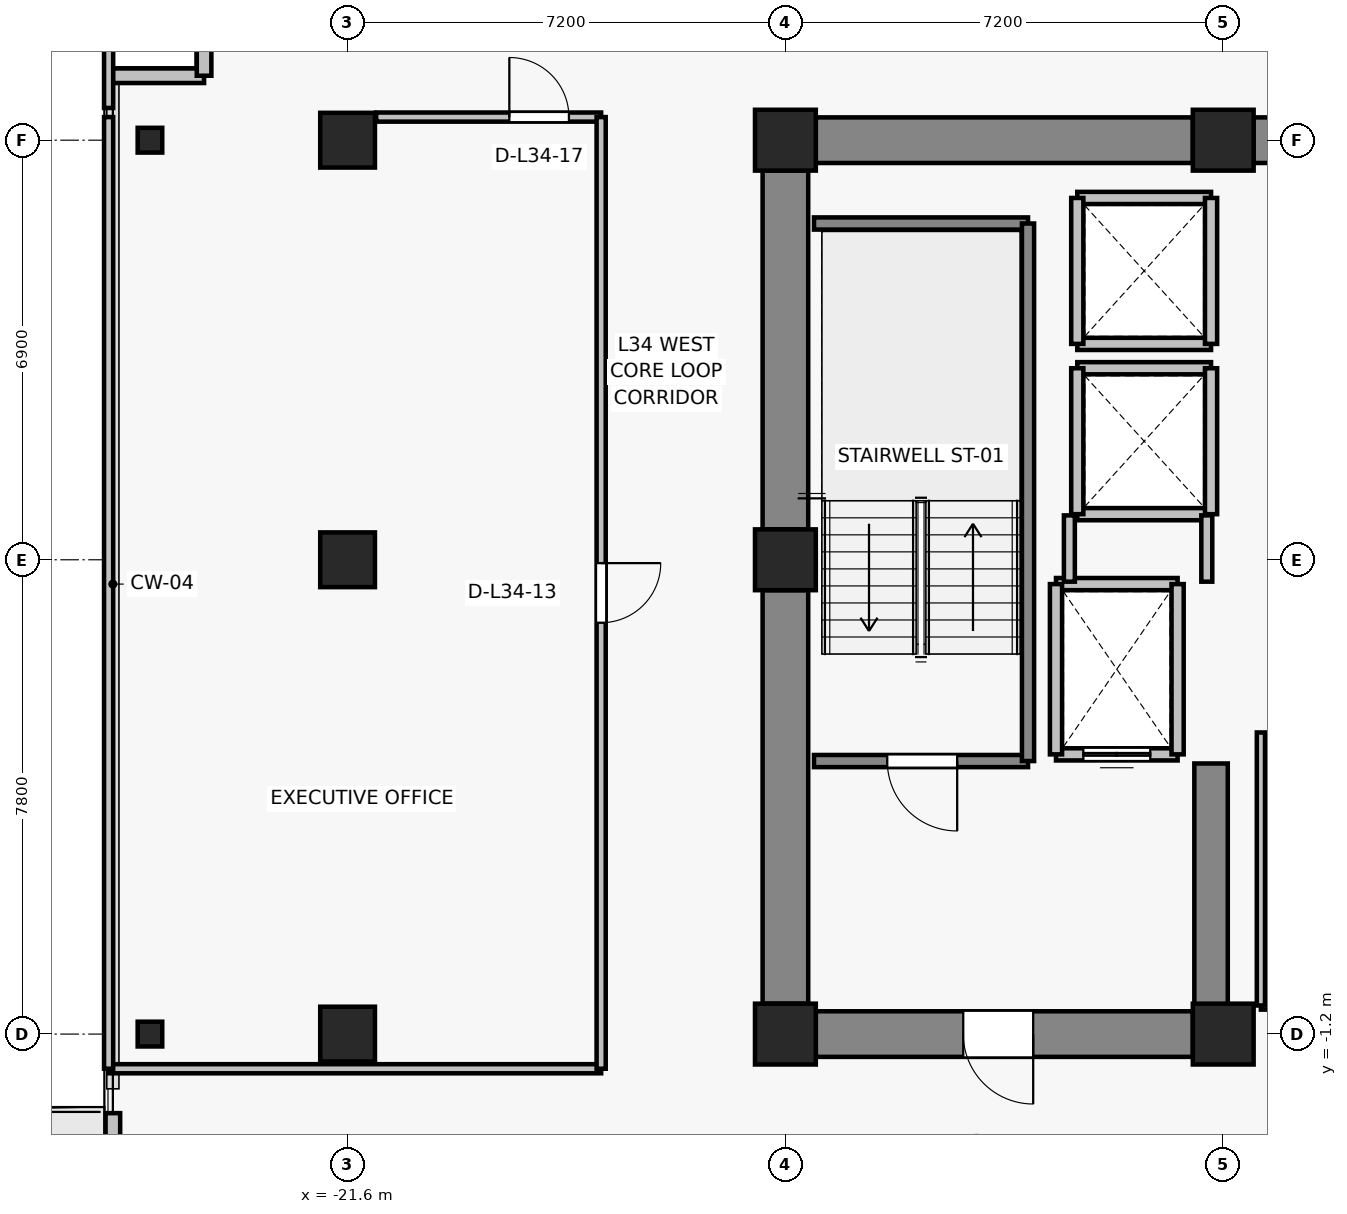
"""IFC4 building model, lengths in metres.
Left out: names, types, materials, properties, quantities, classifications, styles, units other than length and angle.
Written with IfcOpenShell. Run it as: python <this file> out.ifc"""

import sys

from ifc_helpers import new_model, si_unit, direction, frame, frame_2d, origin, origin_2d, place, context, subcontext, project, spatial, rectangle, i_section, extrude, source, transform, mapped, element, fill, save


model = new_model("IFC4")
c1 = context("Model", 3, precision=1e-05, world=origin(), true_north=direction((0.0, 1.0)))
c2 = subcontext(c1, "Body", "Model", "MODEL_VIEW")
j1 = project(units=[si_unit("LENGTHUNIT", "METRE"), si_unit("PLANEANGLEUNIT", "RADIAN")], contexts=[c1])
p1 = place(None, origin())
s1 = spatial("IfcSite", under=j1, at=p1, CompositionType="ELEMENT")
p2 = place(p1, origin())
s2 = spatial("IfcBuilding", under=s1, at=p2, CompositionType="ELEMENT")
p3 = place(p2, frame((0.0, 0.0, 123.1)))
s3 = spatial("IfcBuildingStorey", under=s2, at=p3, CompositionType="ELEMENT", Elevation=123.1)
for number, where, z_axis, x_axis in (
    (1, (-14.4, -1.2, 0.0), (0.0, 0.0, 1.0), (1.0, 0.0, 0.0)),
    (2, (-7.2, -1.2, 0.0), (0.0, 0.0, 1.0), (1.0, 0.0, 0.0)),
    (3, (-14.4, 6.6, 0.0), (0.0, 0.0, 1.0), (1.0, 0.0, 0.0)),
    (4, (-14.4, 13.5, 0.0), (0.0, 0.0, 1.0), (1.0, 0.0, 0.0)),
    (5, (-7.2, 13.5, 0.0), (0.0, 0.0, 1.0), (1.0, 0.0, 0.0)),
):
    element("IfcColumn", number, at=place(p3, frame(where, z_axis=z_axis, x_axis=x_axis)), inside=s3, PredefinedType="COLUMN", context=c2, shape_type="SweptSolid", body=[
        extrude(rectangle(XDim=1.0, YDim=1.0, at=origin_2d()), origin(), (0.0, 0.0, 1.0), 3.3),
    ])
for number, where, z_axis, x_axis in (
    (6, (-21.6, -1.2, 0.0), (0.0, 0.0, 1.0), (1.0, 0.0, 0.0)),
    (7, (-21.6, 6.6, 0.0), (0.0, 0.0, 1.0), (1.0, 0.0, 0.0)),
    (8, (-21.6, 13.5, 0.0), (0.0, 0.0, 1.0), (1.0, 0.0, 0.0)),
):
    element("IfcColumn", number, at=place(p3, frame(where, z_axis=z_axis, x_axis=x_axis)), inside=s3, PredefinedType="COLUMN", context=c2, shape_type="SweptSolid", body=[
        extrude(rectangle(XDim=0.9, YDim=0.9, at=origin_2d()), origin(), (0.0, 0.0, 1.0), 3.3),
    ])
for number, where, z_axis, x_axis in (
    (9, (-24.85, -1.2, 0.0), (0.0, 0.0, 1.0), (1.0, 0.0, 0.0)),
    (10, (-24.85, 13.5, 0.0), (0.0, 0.0, 1.0), (1.0, 0.0, 0.0)),
):
    element("IfcColumn", number, at=place(p3, frame(where, z_axis=z_axis, x_axis=x_axis)), inside=s3, PredefinedType="COLUMN", context=c2, shape_type="SweptSolid", body=[
        extrude(i_section(OverallWidth=0.404, OverallDepth=0.407, WebThickness=0.022, FlangeThickness=0.032, FilletRadius=0.015, at=origin_2d()), origin(), (0.0, 0.0, 1.0), 3.3),
    ])
p4 = place(p3, frame((-13.9, 13.5, 0.0), z_axis=(0.0, 0.0, 1.0), x_axis=(1.0, 0.0, 0.0)))
e11 = element("IfcWall", 11, at=p4, inside=s3, PredefinedType="SHEAR", context=c2, shape_type="SweptSolid", body=[
    extrude(rectangle(XDim=6.2, YDim=0.75, at=frame_2d((3.1, 0.0))), origin(), (0.0, 0.0, 1.0), 3.075),
])
p5 = place(p3, frame((-6.7, 13.5, 0.0), z_axis=(0.0, 0.0, 1.0), x_axis=(1.0, 0.0, 0.0)))
e12 = element("IfcWall", 12, at=p5, inside=s3, PredefinedType="SHEAR", context=c2, shape_type="SweptSolid", body=[
    extrude(rectangle(XDim=13.4, YDim=0.75, at=frame_2d((6.7, 0.0))), origin(), (0.0, 0.0, 1.0), 3.075),
])
p6 = place(p3, frame((-14.4, -0.7, 0.0), z_axis=(0.0, 0.0, 1.0), x_axis=(0.0, 1.0, 0.0)))
e13 = element("IfcWall", 13, at=p6, inside=s3, PredefinedType="SHEAR", context=c2, shape_type="SweptSolid", body=[
    extrude(rectangle(XDim=6.8, YDim=0.75, at=frame_2d((3.4, 0.0))), origin(), (0.0, 0.0, 1.0), 3.075),
])
p7 = place(p3, frame((-14.4, 7.1, 0.0), z_axis=(0.0, 0.0, 1.0), x_axis=(0.0, 1.0, 0.0)))
e14 = element("IfcWall", 14, at=p7, inside=s3, PredefinedType="SHEAR", context=c2, shape_type="SweptSolid", body=[
    extrude(rectangle(XDim=5.9, YDim=0.75, at=frame_2d((2.95, 0.0))), origin(), (0.0, 0.0, 1.0), 3.075),
])
p8 = place(p3, frame((-7.7, -1.2, 0.0), z_axis=(0.0, 0.0, 1.0), x_axis=(-1.0, 0.0, 0.0)))
e15 = element("IfcWall", 15, at=p8, inside=s3, PredefinedType="SHEAR", context=c2, shape_type="SweptSolid", body=[
    extrude(rectangle(XDim=6.2, YDim=0.75, at=frame_2d((3.1, 0.0))), origin(), (0.0, 0.0, 1.0), 3.075),
])
p9 = place(p8, frame((2.625, 0.0, 0.0)))
e16 = element("IfcOpeningElement", 16, at=p9, cuts=e15, PredefinedType="OPENING", context=c2, shape_type="SweptSolid", body=[
    extrude(rectangle(XDim=1.15, YDim=2.15, at=frame_2d((0.575, 1.075))), frame((0.0, 0.385, 0.0), z_axis=(0.0, -1.0, 0.0), x_axis=(1.0, 0.0, 0.0)), (0.0, 0.0, 1.0), 0.77),
])
p10 = place(p3, frame((-7.4, -0.825, 0.0), z_axis=(0.0, 0.0, 1.0), x_axis=(0.0, 1.0, 0.0)))
e17 = element("IfcWall", 17, at=p10, inside=s3, PredefinedType="SHEAR", context=c2, shape_type="SweptSolid", body=[
    extrude(rectangle(XDim=4.075, YDim=0.55, at=frame_2d((2.038, 0.0))), origin(), (0.0, 0.0, 1.0), 3.075),
])
p11 = place(p3, frame((-25.46, -8.3, 0.0), z_axis=(0.0, 0.0, 1.0), x_axis=(0.0, 1.0, 0.0)))
e18 = element("IfcWall", 18, at=p11, inside=s3, PredefinedType="SOLIDWALL", context=c2, shape_type="SweptSolid", body=[
    extrude(rectangle(XDim=5.8, YDim=0.24, at=frame_2d((2.9, 0.0))), origin(), (0.0, 0.0, 1.0), 3.075),
])
p12 = place(p11, frame((0.696, 0.0, 0.0)))
e19 = element("IfcOpeningElement", 19, at=p12, cuts=e18, PredefinedType="OPENING", context=c2, shape_type="SweptSolid", body=[
    extrude(rectangle(XDim=1.0, YDim=2.2, at=frame_2d((0.5, 1.1))), frame((0.0, 0.13, 0.0), z_axis=(0.0, -1.0, 0.0), x_axis=(1.0, 0.0, 0.0)), (0.0, 0.0, 1.0), 0.26),
])
p13 = place(p11, frame((2.046, 0.0, 0.85)))
e20 = element("IfcOpeningElement", 20, at=p13, cuts=e18, PredefinedType="OPENING", context=c2, shape_type="SweptSolid", body=[
    extrude(rectangle(XDim=1.2, YDim=1.5, at=frame_2d((0.6, 0.75))), frame((0.0, 0.13, 0.0), z_axis=(0.0, -1.0, 0.0), x_axis=(1.0, 0.0, 0.0)), (0.0, 0.0, 1.0), 0.26),
])
for number, where, z_axis, x_axis in (
    (21, (-23.96, 14.56, 0.0), (0.0, 0.0, 1.0), (-1.0, 0.0, 0.0)),
    (22, (-23.96, 16.06, 0.0), (0.0, 0.0, 1.0), (0.0, -1.0, 0.0)),
):
    element("IfcWall", number, at=place(p3, frame(where, z_axis=z_axis, x_axis=x_axis)), inside=s3, PredefinedType="SOLIDWALL", context=c2, shape_type="SweptSolid", body=[
        extrude(rectangle(XDim=1.5, YDim=0.24, at=frame_2d((0.75, 0.0))), origin(), (0.0, 0.0, 1.0), 3.075),
    ])
p14 = place(p3, frame((-7.95, 3.4, 0.0), z_axis=(0.0, 0.0, 1.0), x_axis=(-1.0, 0.0, 0.0)))
e23 = element("IfcWall", 23, at=p14, inside=s3, PredefinedType="SOLIDWALL", context=c2, shape_type="SweptSolid", body=[
    extrude(rectangle(XDim=2.0, YDim=0.2, at=frame_2d((1.0, 0.0))), origin(), (0.0, 0.0, 1.0), 3.075),
])
p15 = place(p14, frame((0.45, 0.0, 0.0)))
e24 = element("IfcOpeningElement", 24, at=p15, cuts=e23, PredefinedType="OPENING", context=c2, shape_type="SweptSolid", body=[
    extrude(rectangle(XDim=1.1, YDim=2.2, at=frame_2d((0.55, 1.1))), frame((0.0, 0.11, 0.0), z_axis=(0.0, -1.0, 0.0), x_axis=(1.0, 0.0, 0.0)), (0.0, 0.0, 1.0), 0.22),
])
p16 = place(p3, frame((-9.95, 6.2, 0.0), z_axis=(0.0, 0.0, 1.0), x_axis=(1.0, 0.0, 0.0)))
e25 = element("IfcWall", 25, at=p16, inside=s3, PredefinedType="SOLIDWALL", context=c2, shape_type="SweptSolid", body=[
    extrude(rectangle(XDim=2.0, YDim=0.2, at=frame_2d((1.0, 0.0))), origin(), (0.0, 0.0, 1.0), 3.075),
])
for number, where, z_axis, x_axis in (
    (26, (-9.95, 3.4, 0.0), (0.0, 0.0, 1.0), (0.0, 1.0, 0.0)),
    (27, (-7.95, 6.2, 0.0), (0.0, 0.0, 1.0), (0.0, -1.0, 0.0)),
):
    element("IfcWall", number, at=place(p3, frame(where, z_axis=z_axis, x_axis=x_axis)), inside=s3, PredefinedType="SOLIDWALL", context=c2, shape_type="SweptSolid", body=[
        extrude(rectangle(XDim=2.8, YDim=0.2, at=frame_2d((1.4, 0.0))), origin(), (0.0, 0.0, 1.0), 3.075),
    ])
for number, where, z_axis, x_axis in (
    (28, (-7.4, 7.35, 0.0), (0.0, 0.0, 1.0), (-1.0, 0.0, 0.0)),
    (29, (-9.6, 9.75, 0.0), (0.0, 0.0, 1.0), (1.0, 0.0, 0.0)),
):
    element("IfcWall", number, at=place(p3, frame(where, z_axis=z_axis, x_axis=x_axis)), inside=s3, PredefinedType="SOLIDWALL", context=c2, shape_type="SweptSolid", body=[
        extrude(rectangle(XDim=2.2, YDim=0.2, at=frame_2d((1.1, 0.0))), origin(), (0.0, 0.0, 1.0), 2.515),
    ])
p17 = place(p3, frame((-9.6, 7.35, 0.0), z_axis=(0.0, 0.0, 1.0), x_axis=(0.0, 1.0, 0.0)))
e30 = element("IfcWall", 30, at=p17, inside=s3, PredefinedType="SOLIDWALL", context=c2, shape_type="SweptSolid", body=[
    extrude(rectangle(XDim=2.4, YDim=0.2, at=frame_2d((1.2, 0.0))), origin(), (0.0, 0.0, 1.0), 3.075),
])
p18 = place(p3, frame((-7.4, 9.75, 0.0), z_axis=(0.0, 0.0, 1.0), x_axis=(0.0, -1.0, 0.0)))
e31 = element("IfcWall", 31, at=p18, inside=s3, PredefinedType="SOLIDWALL", context=c2, shape_type="SweptSolid", body=[
    extrude(rectangle(XDim=2.4, YDim=0.2, at=frame_2d((1.2, 0.0))), origin(), (0.0, 0.0, 1.0), 2.515),
])
for number, where, z_axis, x_axis in (
    (32, (-7.4, 10.15, 0.0), (0.0, 0.0, 1.0), (-1.0, 0.0, 0.0)),
    (33, (-9.6, 12.55, 0.0), (0.0, 0.0, 1.0), (1.0, 0.0, 0.0)),
):
    element("IfcWall", number, at=place(p3, frame(where, z_axis=z_axis, x_axis=x_axis)), inside=s3, PredefinedType="SOLIDWALL", context=c2, shape_type="SweptSolid", body=[
        extrude(rectangle(XDim=2.2, YDim=0.2, at=frame_2d((1.1, 0.0))), origin(), (0.0, 0.0, 1.0), 2.515),
    ])
p19 = place(p3, frame((-9.6, 10.15, 0.0), z_axis=(0.0, 0.0, 1.0), x_axis=(0.0, 1.0, 0.0)))
e34 = element("IfcWall", 34, at=p19, inside=s3, PredefinedType="SOLIDWALL", context=c2, shape_type="SweptSolid", body=[
    extrude(rectangle(XDim=2.4, YDim=0.2, at=frame_2d((1.2, 0.0))), origin(), (0.0, 0.0, 1.0), 3.075),
])
p20 = place(p3, frame((-7.4, 12.55, 0.0), z_axis=(0.0, 0.0, 1.0), x_axis=(0.0, -1.0, 0.0)))
e35 = element("IfcWall", 35, at=p20, inside=s3, PredefinedType="SOLIDWALL", context=c2, shape_type="SweptSolid", body=[
    extrude(rectangle(XDim=2.4, YDim=0.2, at=frame_2d((1.2, 0.0))), origin(), (0.0, 0.0, 1.0), 2.515),
])
p21 = place(p3, frame((-10.41, 3.29, 0.0), z_axis=(0.0, 0.0, 1.0), x_axis=(-1.0, 0.0, 0.0)))
e36 = element("IfcWall", 36, at=p21, inside=s3, PredefinedType="SOLIDWALL", context=c2, shape_type="SweptSolid", body=[
    extrude(rectangle(XDim=3.52, YDim=0.2, at=frame_2d((1.76, 0.0))), origin(), (0.0, 0.0, 1.0), 3.075),
])
p22 = place(p21, frame((1.165, 0.0, 0.0)))
e37 = element("IfcOpeningElement", 37, at=p22, cuts=e36, PredefinedType="OPENING", context=c2, shape_type="SweptSolid", body=[
    extrude(rectangle(XDim=1.15, YDim=2.15, at=frame_2d((0.575, 1.075))), frame((0.0, 0.11, 0.0), z_axis=(0.0, -1.0, 0.0), x_axis=(1.0, 0.0, 0.0)), (0.0, 0.0, 1.0), 0.22),
])
p23 = place(p3, frame((-13.93, 12.13, 0.0), z_axis=(0.0, 0.0, 1.0), x_axis=(1.0, 0.0, 0.0)))
e38 = element("IfcWall", 38, at=p23, inside=s3, PredefinedType="SOLIDWALL", context=c2, shape_type="SweptSolid", body=[
    extrude(rectangle(XDim=3.52, YDim=0.2, at=frame_2d((1.76, 0.0))), origin(), (0.0, 0.0, 1.0), 3.075),
])
p24 = place(p3, frame((-10.41, 12.13, 0.0), z_axis=(0.0, 0.0, 1.0), x_axis=(0.0, -1.0, 0.0)))
e39 = element("IfcWall", 39, at=p24, inside=s3, PredefinedType="SOLIDWALL", context=c2, shape_type="SweptSolid", body=[
    extrude(rectangle(XDim=8.84, YDim=0.2, at=frame_2d((4.42, 0.0))), origin(), (0.0, 0.0, 1.0), 3.075),
])
p25 = place(p3, frame((-9.73, 6.24, 0.0), z_axis=(0.0, 0.0, 1.0), x_axis=(0.0, 1.0, 0.0)))
e40 = element("IfcWall", 40, at=p25, inside=s3, PredefinedType="PARTITIONING", context=c2, shape_type="SweptSolid", body=[
    extrude(rectangle(XDim=1.09, YDim=0.18, at=frame_2d((0.545, 0.0))), origin(), (0.0, 0.0, 1.0), 3.075),
])
p26 = place(p3, frame((-7.47, 7.33, 0.0), z_axis=(0.0, 0.0, 1.0), x_axis=(0.0, -1.0, 0.0)))
e41 = element("IfcWall", 41, at=p26, inside=s3, PredefinedType="PARTITIONING", context=c2, shape_type="SweptSolid", body=[
    extrude(rectangle(XDim=1.09, YDim=0.18, at=frame_2d((0.545, 0.0))), origin(), (0.0, 0.0, 1.0), 2.515),
])
p27 = place(p3, frame((-1.47, -0.73, 0.0), z_axis=(0.0, 0.0, 1.0), x_axis=(-1.0, 0.0, 0.0)))
e42 = element("IfcWall", 42, at=p27, inside=s3, PredefinedType="PARTITIONING", context=c2, shape_type="SweptSolid", body=[
    extrude(rectangle(XDim=5.11, YDim=0.135, at=frame_2d((2.555, 0.0))), origin(), (0.0, 0.0, 1.0), 3.075),
])
p28 = place(p3, frame((-6.58, -0.73, 0.0), z_axis=(0.0, 0.0, 1.0), x_axis=(0.0, 1.0, 0.0)))
e43 = element("IfcWall", 43, at=p28, inside=s3, PredefinedType="PARTITIONING", context=c2, shape_type="SweptSolid", body=[
    extrude(rectangle(XDim=4.49, YDim=0.135, at=frame_2d((2.245, 0.0))), origin(), (0.0, 0.0, 1.0), 3.075),
])
p29 = place(p3, frame((-17.43, -1.77, 0.0), z_axis=(0.0, 0.0, 1.0), x_axis=(-1.0, 0.0, 0.0)))
e44 = element("IfcWall", 44, at=p29, inside=s3, PredefinedType="PARTITIONING", context=c2, shape_type="SweptSolid", body=[
    extrude(rectangle(XDim=8.1, YDim=0.15, at=frame_2d((4.05, 0.0))), origin(), (0.0, 0.0, 1.0), 2.515),
])
p30 = place(p3, frame((-21.13, 13.88, 0.0), z_axis=(0.0, 0.0, 1.0), x_axis=(1.0, 0.0, 0.0)))
e45 = element("IfcWall", 45, at=p30, inside=s3, PredefinedType="PARTITIONING", context=c2, shape_type="SweptSolid", body=[
    extrude(rectangle(XDim=3.7, YDim=0.15, at=frame_2d((1.85, 0.0))), origin(), (0.0, 0.0, 1.0), 3.075),
])
p31 = place(p30, frame((2.19, 0.0, 0.0)))
e46 = element("IfcOpeningElement", 46, at=p31, cuts=e45, PredefinedType="OPENING", context=c2, shape_type="SweptSolid", body=[
    extrude(rectangle(XDim=0.98, YDim=2.15, at=frame_2d((0.49, 1.075))), frame((0.0, 0.085, 0.0), z_axis=(0.0, -1.0, 0.0), x_axis=(1.0, 0.0, 0.0)), (0.0, 0.0, 1.0), 0.17),
])
p32 = place(p3, frame((-25.53, -1.77, 0.0), z_axis=(0.0, 0.0, 1.0), x_axis=(0.0, 1.0, 0.0)))
e47 = element("IfcWall", 47, at=p32, inside=s3, PredefinedType="PARTITIONING", context=c2, shape_type="SweptSolid", body=[
    extrude(rectangle(XDim=15.65, YDim=0.15, at=frame_2d((7.825, 0.0))), origin(), (0.0, 0.0, 1.0), 3.075),
])
p33 = place(p3, frame((-17.43, 13.88, 0.0), z_axis=(0.0, 0.0, 1.0), x_axis=(0.0, -1.0, 0.0)))
e48 = element("IfcWall", 48, at=p33, inside=s3, PredefinedType="PARTITIONING", context=c2, shape_type="SweptSolid", body=[
    extrude(rectangle(XDim=15.65, YDim=0.15, at=frame_2d((7.825, 0.0))), origin(), (0.0, 0.0, 1.0), 2.515),
])
p34 = place(p33, frame((7.335, 0.0, 0.0)))
e49 = element("IfcOpeningElement", 49, at=p34, cuts=e48, PredefinedType="OPENING", context=c2, shape_type="SweptSolid", body=[
    extrude(rectangle(XDim=0.98, YDim=2.15, at=frame_2d((0.49, 1.075))), frame((0.0, 0.085, 0.0), z_axis=(0.0, -1.0, 0.0), x_axis=(1.0, 0.0, 0.0)), (0.0, 0.0, 1.0), 0.17),
])
p35 = place(p3, frame((-25.53, 14.03, 0.0), z_axis=(0.0, 0.0, 1.0), x_axis=(0.0, 1.0, 0.0)))
e50 = element("IfcWall", 50, at=p35, inside=s3, PredefinedType="PARTITIONING", context=c2, shape_type="SweptSolid", body=[
    extrude(rectangle(XDim=3.6, YDim=0.15, at=frame_2d((1.8, 0.0))), origin(), (0.0, 0.0, 1.0), 3.075),
])
m1 = source(origin(), c2, "Body", "SweptSolid", [
    extrude(rectangle(XDim=1.1, YDim=2.2, at=frame_2d((0.55, 1.1))), frame((0.0, 0.025, 0.0), z_axis=(0.0, -1.0, 0.0), x_axis=(1.0, 0.0, 0.0)), (0.0, 0.0, 1.0), 0.05),
])
p36 = place(p15, origin())
e51 = element("IfcDoor", 51, at=p36, inside=s3, OperationType="DOUBLE_DOOR_SLIDING", PredefinedType="DOOR", context=c2, shape_type="MappedRepresentation", body=[
    mapped(m1, transform((0.0, 0.0, 0.0), x_axis=(1.0, 0.0, 0.0), y_axis=(0.0, 1.0, 0.0), z_axis=(0.0, 0.0, 1.0), scale=1.0)),
])
fill(e24, e51)
m2 = source(origin(), c2, "Body", "SweptSolid", [
    extrude(rectangle(XDim=1.15, YDim=2.15, at=frame_2d((0.575, 1.075))), frame((0.0, 0.025, 0.0), z_axis=(0.0, -1.0, 0.0), x_axis=(1.0, 0.0, 0.0)), (0.0, 0.0, 1.0), 0.05),
])
p37 = place(p22, origin())
e52 = element("IfcDoor", 52, at=p37, inside=s3, OperationType="SINGLE_SWING_LEFT", PredefinedType="DOOR", context=c2, shape_type="MappedRepresentation", body=[
    mapped(m2, transform((0.0, 0.0, 0.0), x_axis=(1.0, 0.0, 0.0), y_axis=(0.0, 1.0, 0.0), z_axis=(0.0, 0.0, 1.0), scale=1.0)),
])
fill(e37, e52)
p38 = place(p9, origin())
e53 = element("IfcDoor", 53, at=p38, inside=s3, OperationType="SINGLE_SWING_LEFT", PredefinedType="DOOR", context=c2, shape_type="MappedRepresentation", body=[
    mapped(m2, transform((0.0, 0.0, 0.0), x_axis=(1.0, 0.0, 0.0), y_axis=(0.0, 1.0, 0.0), z_axis=(0.0, 0.0, 1.0), scale=1.0)),
])
fill(e16, e53)
m3 = source(origin(), c2, "Body", "SweptSolid", [
    extrude(rectangle(XDim=0.98, YDim=2.15, at=frame_2d((0.49, 1.075))), frame((0.0, 0.025, 0.0), z_axis=(0.0, -1.0, 0.0), x_axis=(1.0, 0.0, 0.0)), (0.0, 0.0, 1.0), 0.05),
])
p39 = place(p34, origin())
e54 = element("IfcDoor", 54, at=p39, inside=s3, OperationType="SINGLE_SWING_LEFT", PredefinedType="DOOR", context=c2, shape_type="MappedRepresentation", body=[
    mapped(m3, transform((0.0, 0.0, 0.0), x_axis=(1.0, 0.0, 0.0), y_axis=(0.0, 1.0, 0.0), z_axis=(0.0, 0.0, 1.0), scale=1.0)),
])
fill(e49, e54)
p40 = place(p31, origin())
e55 = element("IfcDoor", 55, at=p40, inside=s3, OperationType="SINGLE_SWING_LEFT", PredefinedType="DOOR", context=c2, shape_type="MappedRepresentation", body=[
    mapped(m3, transform((0.0, 0.0, 0.0), x_axis=(1.0, 0.0, 0.0), y_axis=(0.0, 1.0, 0.0), z_axis=(0.0, 0.0, 1.0), scale=1.0)),
])
fill(e46, e55)
save(model, sys.argv[1])
